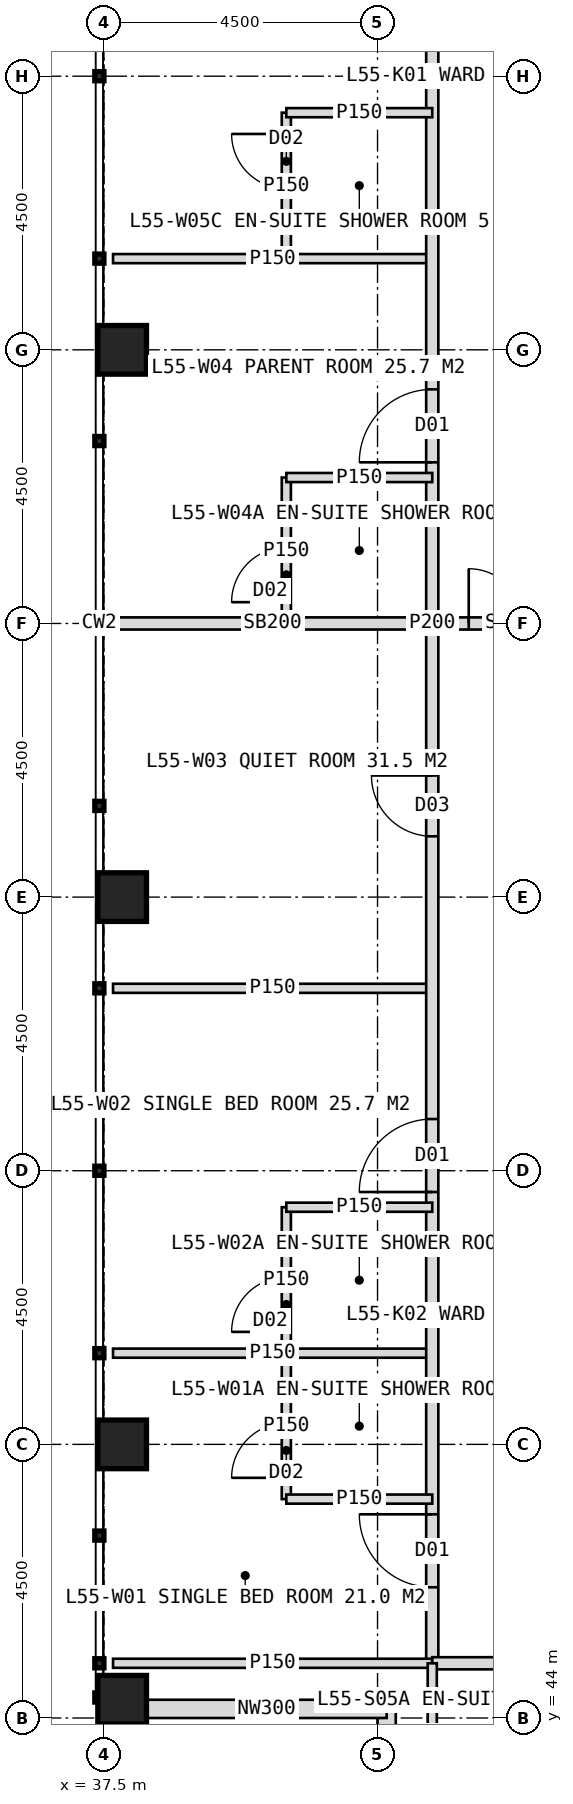
"""IFC4 building model, lengths in metres.
Left out: names, types, materials, properties, quantities, classifications, styles, units other than length and angle.
Written with IfcOpenShell. Run it as: python <this file> out.ifc"""

import sys

from ifc_helpers import new_model, si_unit, direction, frame, frame_2d, origin, origin_2d, place, context, subcontext, project, spatial, rectangle, hollow_rectangle, extrude, element, fill, save


model = new_model("IFC4")
c1 = context("Model", 3, precision=1e-05, world=origin(), true_north=direction((0.0, 1.0)))
c2 = subcontext(c1, "Body", "Model", "MODEL_VIEW")
j1 = project(units=[si_unit("LENGTHUNIT", "METRE"), si_unit("PLANEANGLEUNIT", "RADIAN")], contexts=[c1])
p1 = place(None, origin())
s1 = spatial("IfcSite", under=j1, at=p1, CompositionType="ELEMENT")
p2 = place(p1, origin())
s2 = spatial("IfcBuilding", under=s1, at=p2, CompositionType="ELEMENT")
p3 = place(p2, frame((0.0, 0.0, 229.0)))
s3 = spatial("IfcBuildingStorey", under=s2, at=p3, CompositionType="ELEMENT", Elevation=229.0)
for number, where, z_axis, x_axis in (
    (1, (37.8, 44.3, 0.0), (0.0, 0.0, 1.0), (1.0, 0.0, 0.0)),
    (2, (37.8, 48.5, 0.0), (0.0, 0.0, 1.0), (1.0, 0.0, 0.0)),
    (3, (37.8, 57.5, 0.0), (0.0, 0.0, 1.0), (1.0, 0.0, 0.0)),
    (4, (37.8, 66.5, 0.0), (0.0, 0.0, 1.0), (1.0, 0.0, 0.0)),
):
    element("IfcColumn", number, at=place(p3, frame(where, z_axis=z_axis, x_axis=x_axis)), inside=s3, PredefinedType="COLUMN", context=c2, shape_type="SweptSolid", body=[
        extrude(hollow_rectangle(XDim=0.8, YDim=0.8, WallThickness=0.08, at=origin_2d()), origin(), (0.0, 0.0, 1.0), 4.0),
    ])
for number, where, z_axis, x_axis in (
    (5, (42.15, 40.2, 0.0), (0.0, 0.0, 1.0), (0.0, 1.0, 0.0)),
    (6, (42.15, 44.15, 0.0), (0.0, 0.0, 1.0), (-1.0, 0.0, 0.0)),
):
    element("IfcWall", number, at=place(p3, frame(where, z_axis=z_axis, x_axis=x_axis)), inside=s3, PredefinedType="ELEMENTEDWALL", context=c2, shape_type="SweptSolid", body=[
        extrude(rectangle(XDim=3.95, YDim=0.3, at=frame_2d((1.975, 0.0))), origin(), (0.0, 0.0, 1.0), 2.85),
    ])
for number, where, z_axis, x_axis in (
    (7, (42.9, 50.0, 0.0), (0.0, 0.0, 1.0), (-1.0, 0.0, 0.0)),
    (8, (42.9, 56.0, 0.0), (0.0, 0.0, 1.0), (-1.0, 0.0, 0.0)),
):
    element("IfcWall", number, at=place(p3, frame(where, z_axis=z_axis, x_axis=x_axis)), inside=s3, PredefinedType="PARTITIONING", context=c2, shape_type="SweptSolid", body=[
        extrude(rectangle(XDim=5.25, YDim=0.15, at=frame_2d((2.625, 0.0))), origin(), (0.0, 0.0, 1.0), 3.75),
    ])
p4 = place(p3, frame((42.9, 62.0, 0.0), z_axis=(0.0, 0.0, 1.0), x_axis=(-1.0, 0.0, 0.0)))
e9 = element("IfcWall", 9, at=p4, inside=s3, PredefinedType="SOLIDWALL", context=c2, shape_type="SweptSolid", body=[
    extrude(rectangle(XDim=5.25, YDim=0.2, at=frame_2d((2.625, 0.0))), origin(), (0.0, 0.0, 1.0), 2.95),
])
p5 = place(p3, frame((42.9, 68.0, 0.0), z_axis=(0.0, 0.0, 1.0), x_axis=(-1.0, 0.0, 0.0)))
e10 = element("IfcWall", 10, at=p5, inside=s3, PredefinedType="PARTITIONING", context=c2, shape_type="SweptSolid", body=[
    extrude(rectangle(XDim=5.25, YDim=0.15, at=frame_2d((2.625, 0.0))), origin(), (0.0, 0.0, 1.0), 3.75),
])
p6 = place(p3, frame((42.9, 44.9, 0.0), z_axis=(0.0, 0.0, 1.0), x_axis=(0.0, 1.0, 0.0)))
e11 = element("IfcWall", 11, at=p6, inside=s3, PredefinedType="PARTITIONING", context=c2, shape_type="SweptSolid", body=[
    extrude(rectangle(XDim=34.2, YDim=0.2, at=frame_2d((17.1, 0.0))), origin(), (0.0, 0.0, 1.0), 3.75),
])
p7 = place(p6, frame((1.25, 0.0, 0.0)))
e12 = element("IfcOpeningElement", 12, at=p7, cuts=e11, PredefinedType="OPENING", context=c2, shape_type="SweptSolid", body=[
    extrude(rectangle(XDim=1.2, YDim=2.2, at=frame_2d((0.6, 1.1))), frame((0.0, 0.11, 0.0), z_axis=(0.0, -1.0, 0.0), x_axis=(1.0, 0.0, 0.0)), (0.0, 0.0, 1.0), 0.22),
])
p8 = place(p6, frame((7.75, 0.0, 0.0)))
e13 = element("IfcOpeningElement", 13, at=p8, cuts=e11, PredefinedType="OPENING", context=c2, shape_type="SweptSolid", body=[
    extrude(rectangle(XDim=1.2, YDim=2.2, at=frame_2d((0.6, 1.1))), frame((0.0, 0.11, 0.0), z_axis=(0.0, -1.0, 0.0), x_axis=(1.0, 0.0, 0.0)), (0.0, 0.0, 1.0), 0.22),
])
p9 = place(p6, frame((13.6, 0.0, 0.0)))
e14 = element("IfcOpeningElement", 14, at=p9, cuts=e11, PredefinedType="OPENING", context=c2, shape_type="SweptSolid", body=[
    extrude(rectangle(XDim=1.0, YDim=2.1, at=frame_2d((0.5, 1.05))), frame((0.0, 0.11, 0.0), z_axis=(0.0, -1.0, 0.0), x_axis=(1.0, 0.0, 0.0)), (0.0, 0.0, 1.0), 0.22),
])
p10 = place(p6, frame((19.75, 0.0, 0.0)))
e15 = element("IfcOpeningElement", 15, at=p10, cuts=e11, PredefinedType="OPENING", context=c2, shape_type="SweptSolid", body=[
    extrude(rectangle(XDim=1.2, YDim=2.2, at=frame_2d((0.6, 1.1))), frame((0.0, 0.11, 0.0), z_axis=(0.0, -1.0, 0.0), x_axis=(1.0, 0.0, 0.0)), (0.0, 0.0, 1.0), 0.22),
])
p11 = place(p6, frame((30.35, 0.0, 0.0)))
e16 = element("IfcOpeningElement", 16, at=p11, cuts=e11, PredefinedType="OPENING", context=c2, shape_type="SweptSolid", body=[
    extrude(rectangle(XDim=1.2, YDim=2.2, at=frame_2d((0.6, 1.1))), frame((0.0, 0.11, 0.0), z_axis=(0.0, -1.0, 0.0), x_axis=(1.0, 0.0, 0.0)), (0.0, 0.0, 1.0), 0.22),
])
p12 = place(p3, frame((42.9, 44.9, 0.0), z_axis=(0.0, 0.0, 1.0), x_axis=(-1.0, 0.0, 0.0)))
e17 = element("IfcWall", 17, at=p12, inside=s3, PredefinedType="PARTITIONING", context=c2, shape_type="SweptSolid", body=[
    extrude(rectangle(XDim=5.25, YDim=0.15, at=frame_2d((2.625, 0.0))), origin(), (0.0, 0.0, 1.0), 3.75),
])
p13 = place(p3, frame((40.5, 47.6, 0.0), z_axis=(0.0, 0.0, 1.0), x_axis=(0.0, 1.0, 0.0)))
e18 = element("IfcWall", 18, at=p13, inside=s3, PredefinedType="PARTITIONING", context=c2, shape_type="SweptSolid", body=[
    extrude(rectangle(XDim=2.4, YDim=0.15, at=frame_2d((1.2, 0.0))), origin(), (0.0, 0.0, 1.0), 3.75),
])
p14 = place(p13, frame((0.35, 0.0, 0.0)))
e19 = element("IfcOpeningElement", 19, at=p14, cuts=e18, PredefinedType="OPENING", context=c2, shape_type="SweptSolid", body=[
    extrude(rectangle(XDim=0.9, YDim=2.1, at=frame_2d((0.45, 1.05))), frame((0.0, 0.085, 0.0), z_axis=(0.0, -1.0, 0.0), x_axis=(1.0, 0.0, 0.0)), (0.0, 0.0, 1.0), 0.17),
])
p15 = place(p3, frame((42.9, 47.6, 0.0), z_axis=(0.0, 0.0, 1.0), x_axis=(-1.0, 0.0, 0.0)))
e20 = element("IfcWall", 20, at=p15, inside=s3, PredefinedType="PARTITIONING", context=c2, shape_type="SweptSolid", body=[
    extrude(rectangle(XDim=2.4, YDim=0.15, at=frame_2d((1.2, 0.0))), origin(), (0.0, 0.0, 1.0), 3.75),
])
p16 = place(p3, frame((40.5, 50.0, 0.0), z_axis=(0.0, 0.0, 1.0), x_axis=(0.0, 1.0, 0.0)))
e21 = element("IfcWall", 21, at=p16, inside=s3, PredefinedType="PARTITIONING", context=c2, shape_type="SweptSolid", body=[
    extrude(rectangle(XDim=2.4, YDim=0.15, at=frame_2d((1.2, 0.0))), origin(), (0.0, 0.0, 1.0), 3.75),
])
p17 = place(p16, frame((0.35, 0.0, 0.0)))
e22 = element("IfcOpeningElement", 22, at=p17, cuts=e21, PredefinedType="OPENING", context=c2, shape_type="SweptSolid", body=[
    extrude(rectangle(XDim=0.9, YDim=2.1, at=frame_2d((0.45, 1.05))), frame((0.0, 0.085, 0.0), z_axis=(0.0, -1.0, 0.0), x_axis=(1.0, 0.0, 0.0)), (0.0, 0.0, 1.0), 0.17),
])
p18 = place(p3, frame((42.9, 52.4, 0.0), z_axis=(0.0, 0.0, 1.0), x_axis=(-1.0, 0.0, 0.0)))
e23 = element("IfcWall", 23, at=p18, inside=s3, PredefinedType="PARTITIONING", context=c2, shape_type="SweptSolid", body=[
    extrude(rectangle(XDim=2.4, YDim=0.15, at=frame_2d((1.2, 0.0))), origin(), (0.0, 0.0, 1.0), 3.75),
])
p19 = place(p3, frame((40.5, 62.0, 0.0), z_axis=(0.0, 0.0, 1.0), x_axis=(0.0, 1.0, 0.0)))
e24 = element("IfcWall", 24, at=p19, inside=s3, PredefinedType="PARTITIONING", context=c2, shape_type="SweptSolid", body=[
    extrude(rectangle(XDim=2.4, YDim=0.15, at=frame_2d((1.2, 0.0))), origin(), (0.0, 0.0, 1.0), 3.75),
])
p20 = place(p19, frame((0.35, 0.0, 0.0)))
e25 = element("IfcOpeningElement", 25, at=p20, cuts=e24, PredefinedType="OPENING", context=c2, shape_type="SweptSolid", body=[
    extrude(rectangle(XDim=0.9, YDim=2.1, at=frame_2d((0.45, 1.05))), frame((0.0, 0.085, 0.0), z_axis=(0.0, -1.0, 0.0), x_axis=(1.0, 0.0, 0.0)), (0.0, 0.0, 1.0), 0.17),
])
p21 = place(p3, frame((42.9, 64.4, 0.0), z_axis=(0.0, 0.0, 1.0), x_axis=(-1.0, 0.0, 0.0)))
e26 = element("IfcWall", 26, at=p21, inside=s3, PredefinedType="PARTITIONING", context=c2, shape_type="SweptSolid", body=[
    extrude(rectangle(XDim=2.4, YDim=0.15, at=frame_2d((1.2, 0.0))), origin(), (0.0, 0.0, 1.0), 3.75),
])
p22 = place(p3, frame((40.5, 68.0, 0.0), z_axis=(0.0, 0.0, 1.0), x_axis=(0.0, 1.0, 0.0)))
e27 = element("IfcWall", 27, at=p22, inside=s3, PredefinedType="PARTITIONING", context=c2, shape_type="SweptSolid", body=[
    extrude(rectangle(XDim=2.4, YDim=0.15, at=frame_2d((1.2, 0.0))), origin(), (0.0, 0.0, 1.0), 3.75),
])
p23 = place(p22, frame((1.15, 0.0, 0.0)))
e28 = element("IfcOpeningElement", 28, at=p23, cuts=e27, PredefinedType="OPENING", context=c2, shape_type="SweptSolid", body=[
    extrude(rectangle(XDim=0.9, YDim=2.1, at=frame_2d((0.45, 1.05))), frame((0.0, 0.085, 0.0), z_axis=(0.0, -1.0, 0.0), x_axis=(1.0, 0.0, 0.0)), (0.0, 0.0, 1.0), 0.17),
])
p24 = place(p3, frame((42.9, 70.4, 0.0), z_axis=(0.0, 0.0, 1.0), x_axis=(-1.0, 0.0, 0.0)))
e29 = element("IfcWall", 29, at=p24, inside=s3, PredefinedType="PARTITIONING", context=c2, shape_type="SweptSolid", body=[
    extrude(rectangle(XDim=2.4, YDim=0.15, at=frame_2d((1.2, 0.0))), origin(), (0.0, 0.0, 1.0), 3.75),
])
p25 = place(p3, frame((77.1, 44.9, 0.0), z_axis=(0.0, 0.0, 1.0), x_axis=(-1.0, 0.0, 0.0)))
e30 = element("IfcWall", 30, at=p25, inside=s3, PredefinedType="PARTITIONING", context=c2, shape_type="SweptSolid", body=[
    extrude(rectangle(XDim=34.2, YDim=0.2, at=frame_2d((17.1, 0.0))), origin(), (0.0, 0.0, 1.0), 3.75),
])
p26 = place(p25, frame((1.25, 0.0, 0.0)))
e31 = element("IfcOpeningElement", 31, at=p26, cuts=e30, PredefinedType="OPENING", context=c2, shape_type="SweptSolid", body=[
    extrude(rectangle(XDim=1.2, YDim=2.2, at=frame_2d((0.6, 1.1))), frame((0.0, 0.11, 0.0), z_axis=(0.0, -1.0, 0.0), x_axis=(1.0, 0.0, 0.0)), (0.0, 0.0, 1.0), 0.22),
])
p27 = place(p25, frame((7.75, 0.0, 0.0)))
e32 = element("IfcOpeningElement", 32, at=p27, cuts=e30, PredefinedType="OPENING", context=c2, shape_type="SweptSolid", body=[
    extrude(rectangle(XDim=1.2, YDim=2.2, at=frame_2d((0.6, 1.1))), frame((0.0, 0.11, 0.0), z_axis=(0.0, -1.0, 0.0), x_axis=(1.0, 0.0, 0.0)), (0.0, 0.0, 1.0), 0.22),
])
p28 = place(p25, frame((13.25, 0.0, 0.0)))
e33 = element("IfcOpeningElement", 33, at=p28, cuts=e30, PredefinedType="OPENING", context=c2, shape_type="SweptSolid", body=[
    extrude(rectangle(XDim=1.2, YDim=2.2, at=frame_2d((0.6, 1.1))), frame((0.0, 0.11, 0.0), z_axis=(0.0, -1.0, 0.0), x_axis=(1.0, 0.0, 0.0)), (0.0, 0.0, 1.0), 0.22),
])
p29 = place(p25, frame((19.75, 0.0, 0.0)))
e34 = element("IfcOpeningElement", 34, at=p29, cuts=e30, PredefinedType="OPENING", context=c2, shape_type="SweptSolid", body=[
    extrude(rectangle(XDim=1.2, YDim=2.2, at=frame_2d((0.6, 1.1))), frame((0.0, 0.11, 0.0), z_axis=(0.0, -1.0, 0.0), x_axis=(1.0, 0.0, 0.0)), (0.0, 0.0, 1.0), 0.22),
])
p30 = place(p25, frame((30.35, 0.0, 0.0)))
e35 = element("IfcOpeningElement", 35, at=p30, cuts=e30, PredefinedType="OPENING", context=c2, shape_type="SweptSolid", body=[
    extrude(rectangle(XDim=1.2, YDim=2.2, at=frame_2d((0.6, 1.1))), frame((0.0, 0.11, 0.0), z_axis=(0.0, -1.0, 0.0), x_axis=(1.0, 0.0, 0.0)), (0.0, 0.0, 1.0), 0.22),
])
p31 = place(p3, frame((42.9, 44.9, 0.0), z_axis=(0.0, 0.0, 1.0), x_axis=(0.0, -1.0, 0.0)))
e36 = element("IfcWall", 36, at=p31, inside=s3, PredefinedType="PARTITIONING", context=c2, shape_type="SweptSolid", body=[
    extrude(rectangle(XDim=2.4, YDim=0.15, at=frame_2d((1.2, 0.0))), origin(), (0.0, 0.0, 1.0), 3.75),
])
p32 = place(p3, frame((45.6, 62.0, 0.0), z_axis=(0.0, 0.0, 1.0), x_axis=(-1.0, 0.0, 0.0)))
e37 = element("IfcWall", 37, at=p32, inside=s3, PredefinedType="SOLIDWALL", context=c2, shape_type="SweptSolid", body=[
    extrude(rectangle(XDim=2.7, YDim=0.2, at=frame_2d((1.35, 0.0))), origin(), (0.0, 0.0, 1.0), 2.95),
])
p33 = place(p32, frame((0.3, 0.0, 0.0)))
e38 = element("IfcOpeningElement", 38, at=p33, cuts=e37, PredefinedType="OPENING", context=c2, shape_type="SweptSolid", body=[
    extrude(rectangle(XDim=1.8, YDim=2.2, at=frame_2d((0.9, 1.1))), frame((0.0, 0.11, 0.0), z_axis=(0.0, -1.0, 0.0), x_axis=(1.0, 0.0, 0.0)), (0.0, 0.0, 1.0), 0.22),
])
p34 = place(p7, origin())
e39 = element("IfcDoor", 39, at=p34, inside=s3, OperationType="SINGLE_SWING_RIGHT", PredefinedType="DOOR", context=c2, shape_type="SweptSolid", body=[
    extrude(rectangle(XDim=1.2, YDim=2.2, at=frame_2d((0.6, 1.1))), frame((0.0, 0.025, 0.0), z_axis=(0.0, -1.0, 0.0), x_axis=(1.0, 0.0, 0.0)), (0.0, 0.0, 1.0), 0.05),
])
fill(e12, e39)
p35 = place(p14, origin())
e40 = element("IfcDoor", 40, at=p35, inside=s3, OperationType="SINGLE_SWING_LEFT", PredefinedType="DOOR", context=c2, shape_type="SweptSolid", body=[
    extrude(rectangle(XDim=0.9, YDim=2.1, at=frame_2d((0.45, 1.05))), frame((0.0, 0.025, 0.0), z_axis=(0.0, -1.0, 0.0), x_axis=(1.0, 0.0, 0.0)), (0.0, 0.0, 1.0), 0.05),
])
fill(e19, e40)
p36 = place(p8, origin())
e41 = element("IfcDoor", 41, at=p36, inside=s3, OperationType="SINGLE_SWING_LEFT", PredefinedType="DOOR", context=c2, shape_type="SweptSolid", body=[
    extrude(rectangle(XDim=1.2, YDim=2.2, at=frame_2d((0.6, 1.1))), frame((0.0, 0.025, 0.0), z_axis=(0.0, -1.0, 0.0), x_axis=(1.0, 0.0, 0.0)), (0.0, 0.0, 1.0), 0.05),
])
fill(e13, e41)
p37 = place(p17, origin())
e42 = element("IfcDoor", 42, at=p37, inside=s3, OperationType="SINGLE_SWING_LEFT", PredefinedType="DOOR", context=c2, shape_type="SweptSolid", body=[
    extrude(rectangle(XDim=0.9, YDim=2.1, at=frame_2d((0.45, 1.05))), frame((0.0, 0.025, 0.0), z_axis=(0.0, -1.0, 0.0), x_axis=(1.0, 0.0, 0.0)), (0.0, 0.0, 1.0), 0.05),
])
fill(e22, e42)
p38 = place(p9, origin())
e43 = element("IfcDoor", 43, at=p38, inside=s3, OperationType="SINGLE_SWING_RIGHT", PredefinedType="DOOR", context=c2, shape_type="SweptSolid", body=[
    extrude(rectangle(XDim=1.0, YDim=2.1, at=frame_2d((0.5, 1.05))), frame((0.0, 0.025, 0.0), z_axis=(0.0, -1.0, 0.0), x_axis=(1.0, 0.0, 0.0)), (0.0, 0.0, 1.0), 0.05),
])
fill(e14, e43)
p39 = place(p10, origin())
e44 = element("IfcDoor", 44, at=p39, inside=s3, OperationType="SINGLE_SWING_LEFT", PredefinedType="DOOR", context=c2, shape_type="SweptSolid", body=[
    extrude(rectangle(XDim=1.2, YDim=2.2, at=frame_2d((0.6, 1.1))), frame((0.0, 0.025, 0.0), z_axis=(0.0, -1.0, 0.0), x_axis=(1.0, 0.0, 0.0)), (0.0, 0.0, 1.0), 0.05),
])
fill(e15, e44)
p40 = place(p20, origin())
e45 = element("IfcDoor", 45, at=p40, inside=s3, OperationType="SINGLE_SWING_LEFT", PredefinedType="DOOR", context=c2, shape_type="SweptSolid", body=[
    extrude(rectangle(XDim=0.9, YDim=2.1, at=frame_2d((0.45, 1.05))), frame((0.0, 0.025, 0.0), z_axis=(0.0, -1.0, 0.0), x_axis=(1.0, 0.0, 0.0)), (0.0, 0.0, 1.0), 0.05),
])
fill(e25, e45)
p41 = place(p23, origin())
e46 = element("IfcDoor", 46, at=p41, inside=s3, OperationType="SINGLE_SWING_RIGHT", PredefinedType="DOOR", context=c2, shape_type="SweptSolid", body=[
    extrude(rectangle(XDim=0.9, YDim=2.1, at=frame_2d((0.45, 1.05))), frame((0.0, 0.025, 0.0), z_axis=(0.0, -1.0, 0.0), x_axis=(1.0, 0.0, 0.0)), (0.0, 0.0, 1.0), 0.05),
])
fill(e28, e46)
p42 = place(p33, origin())
e47 = element("IfcDoor", 47, at=p42, inside=s3, OperationType="DOUBLE_DOOR_DOUBLE_SWING", PredefinedType="DOOR", context=c2, shape_type="SweptSolid", body=[
    extrude(rectangle(XDim=1.8, YDim=2.2, at=frame_2d((0.9, 1.1))), frame((0.0, 0.025, 0.0), z_axis=(0.0, -1.0, 0.0), x_axis=(1.0, 0.0, 0.0)), (0.0, 0.0, 1.0), 0.05),
])
fill(e38, e47)
save(model, sys.argv[1])
